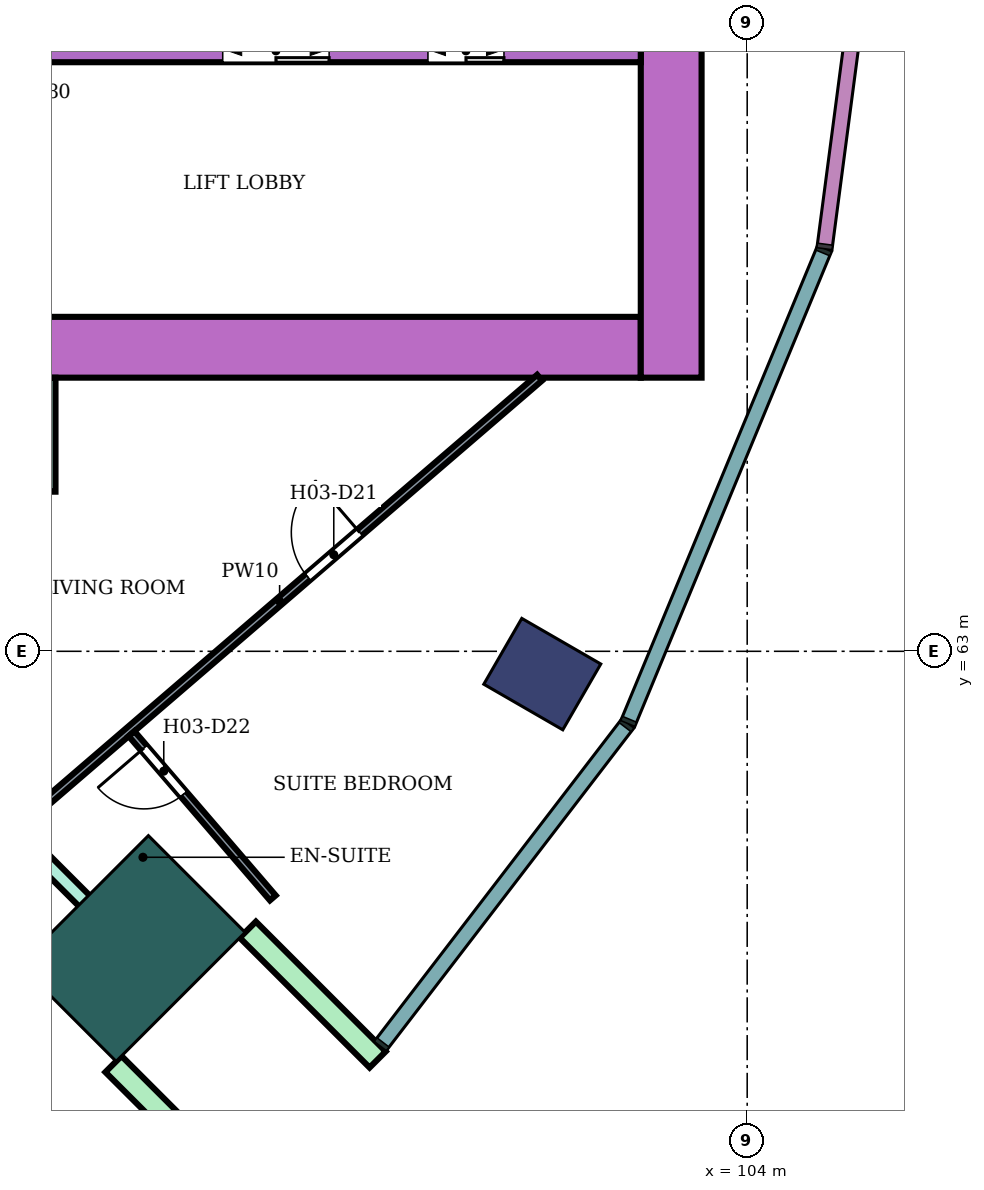
"""IFC4 building model, lengths in metres.
Left out: names, types, materials, properties, quantities, classifications, styles, units other than length and angle.
Written with IfcOpenShell. Run it as: python <this file> out.ifc"""

import sys

from ifc_helpers import new_model, si_unit, direction, frame, frame_2d, origin, origin_2d, place, context, subcontext, project, spatial, rectangle, extrude, element, fill, save


model = new_model("IFC4")
c1 = context("Model", 3, precision=1e-05, world=origin(), true_north=direction((0.0, 1.0)))
c2 = subcontext(c1, "Body", "Model", "MODEL_VIEW")
j1 = project(units=[si_unit("LENGTHUNIT", "METRE"), si_unit("PLANEANGLEUNIT", "RADIAN")], contexts=[c1])
p1 = place(None, origin())
s1 = spatial("IfcSite", under=j1, at=p1, CompositionType="ELEMENT")
p2 = place(p1, origin())
s2 = spatial("IfcBuilding", under=s1, at=p2, CompositionType="ELEMENT")
p3 = place(p2, frame((0.0, 0.0, 55.4)))
s3 = spatial("IfcBuildingStorey", under=s2, at=p3, CompositionType="ELEMENT", Elevation=55.4)
p4 = place(p3, frame((101.304, 62.7, 0.0), z_axis=(0.0, 0.0, 1.0), x_axis=(0.866025403784, -0.5, 0.0)))
e1 = element("IfcColumn", 1, at=p4, inside=s3, PredefinedType="COLUMN", context=c2, shape_type="SweptSolid", body=[
    extrude(rectangle(XDim=1.2, YDim=1.0, at=origin_2d()), origin(), (0.0, 0.0, 1.0), 3.8),
])
p5 = place(p3, frame((95.91, 59.09, 0.0), z_axis=(0.0, 0.0, 1.0), x_axis=(0.707106781187, -0.707106781187, 0.0)))
e2 = element("IfcColumn", 2, at=p5, inside=s3, PredefinedType="COLUMN", context=c2, shape_type="SweptSolid", body=[
    extrude(rectangle(XDim=1.8, YDim=2.4, at=origin_2d()), origin(), (0.0, 0.0, 1.0), 3.8),
])
p6 = place(p3, frame((87.9, 67.0, 0.0), z_axis=(0.0, 0.0, 1.0), x_axis=(1.0, 0.0, 0.0)))
e3 = element("IfcWall", 3, at=p6, inside=s3, PredefinedType="SHEAR", context=c2, shape_type="SweptSolid", body=[
    extrude(rectangle(XDim=14.7, YDim=0.8, at=frame_2d((7.35, 0.0))), origin(), (0.0, 0.0, 1.0), 3.48),
])
p7 = place(p6, frame((4.2, 0.0, 0.0)))
e4 = element("IfcOpeningElement", 4, at=p7, cuts=e3, PredefinedType="OPENING", context=c2, shape_type="SweptSolid", body=[
    extrude(rectangle(XDim=2.4, YDim=2.4, at=frame_2d((1.2, 1.2))), frame((0.0, 0.41, 0.0), z_axis=(0.0, -1.0, 0.0), x_axis=(1.0, 0.0, 0.0)), (0.0, 0.0, 1.0), 0.82),
])
p8 = place(p3, frame((103.0, 66.6, 0.0), z_axis=(0.0, 0.0, 1.0), x_axis=(0.0, 1.0, 0.0)))
e5 = element("IfcWall", 5, at=p8, inside=s3, PredefinedType="SHEAR", context=c2, shape_type="SweptSolid", body=[
    extrude(rectangle(XDim=16.8, YDim=0.8, at=frame_2d((8.4, 0.0))), origin(), (0.0, 0.0, 1.0), 3.48),
])
p9 = place(p3, frame((91.7, 70.9, 0.0), z_axis=(0.0, 0.0, 1.0), x_axis=(1.0, 0.0, 0.0)))
e6 = element("IfcWall", 6, at=p9, inside=s3, PredefinedType="SHEAR", context=c2, shape_type="SweptSolid", body=[
    extrude(rectangle(XDim=10.9, YDim=0.3, at=frame_2d((5.45, 0.0))), origin(), (0.0, 0.0, 1.0), 3.48),
])
p10 = place(p9, frame((0.4, 0.0, 0.0)))
e7 = element("IfcOpeningElement", 7, at=p10, cuts=e6, PredefinedType="OPENING", context=c2, shape_type="SweptSolid", body=[
    extrude(rectangle(XDim=1.4, YDim=2.1, at=frame_2d((0.7, 1.05))), frame((0.0, 0.16, 0.0), z_axis=(0.0, -1.0, 0.0), x_axis=(1.0, 0.0, 0.0)), (0.0, 0.0, 1.0), 0.32),
])
p11 = place(p9, frame((5.4, 0.0, 0.0)))
e8 = element("IfcOpeningElement", 8, at=p11, cuts=e6, PredefinedType="OPENING", context=c2, shape_type="SweptSolid", body=[
    extrude(rectangle(XDim=1.4, YDim=2.1, at=frame_2d((0.7, 1.05))), frame((0.0, 0.16, 0.0), z_axis=(0.0, -1.0, 0.0), x_axis=(1.0, 0.0, 0.0)), (0.0, 0.0, 1.0), 0.32),
])
p12 = place(p9, frame((8.1, 0.0, 0.0)))
e9 = element("IfcOpeningElement", 9, at=p12, cuts=e6, PredefinedType="OPENING", context=c2, shape_type="SweptSolid", body=[
    extrude(rectangle(XDim=1.0, YDim=2.1, at=frame_2d((0.5, 1.05))), frame((0.0, 0.16, 0.0), z_axis=(0.0, -1.0, 0.0), x_axis=(1.0, 0.0, 0.0)), (0.0, 0.0, 1.0), 0.32),
])
for number, where, z_axis, x_axis in (
    (10, (95.662, 57.57, 0.0), (0.0, 0.0, 1.0), (0.707, -0.707, 0.0)),
    (11, (97.43, 59.338, 0.0), (0.0, 0.0, 1.0), (0.707, -0.707, 0.0)),
):
    element("IfcWall", number, at=place(p3, frame(where, z_axis=z_axis, x_axis=x_axis)), inside=s3, PredefinedType="NOTDEFINED", context=c2, shape_type="SweptSolid", body=[
        extrude(rectangle(XDim=2.416, YDim=0.3, at=frame_2d((1.208, 0.0))), origin(), (0.0, 0.0, 1.0), 3.8),
    ])
p13 = place(p3, frame((91.449, 63.548, 0.0), z_axis=(0.0, 0.0, 1.0), x_axis=(0.706984810649, -0.707228730688, 0.0)))
e12 = element("IfcWall", 12, at=p13, inside=s3, PredefinedType="PARTITIONING", context=c2, shape_type="SweptSolid", body=[
    extrude(rectangle(XDim=7.006, YDim=0.2, at=frame_2d((3.503, 0.0))), origin(), (0.0, 0.0, 1.0), 3.35),
])
p14 = place(p3, frame((94.8, 65.1, 0.0), z_axis=(0.0, 0.0, 1.0), x_axis=(0.0, 1.0, 0.0)))
e13 = element("IfcWall", 13, at=p14, inside=s3, PredefinedType="PARTITIONING", context=c2, shape_type="SweptSolid", body=[
    extrude(rectangle(XDim=1.499, YDim=0.2, at=frame_2d((0.75, 0.0))), origin(), (0.0, 0.0, 1.0), 3.35),
])
p15 = place(p3, frame((94.428, 60.715, 0.0), z_axis=(0.0, 0.0, 1.0), x_axis=(0.758117248367, 0.65211826974, 0.0)))
e14 = element("IfcWall", 14, at=p15, inside=s3, PredefinedType="PARTITIONING", context=c2, shape_type="SweptSolid", body=[
    extrude(rectangle(XDim=9.024, YDim=0.1, at=frame_2d((4.512, 0.0))), origin(), (0.0, 0.0, 1.0), 3.35),
])
p16 = place(p15, frame((5.002, 0.0, 0.0)))
e15 = element("IfcOpeningElement", 15, at=p16, cuts=e14, PredefinedType="OPENING", context=c2, shape_type="SweptSolid", body=[
    extrude(rectangle(XDim=0.9, YDim=2.1, at=frame_2d((0.45, 1.05))), frame((0.0, 0.06, 0.0), z_axis=(0.0, -1.0, 0.0), x_axis=(1.0, 0.0, 0.0)), (0.0, 0.0, 1.0), 0.12),
])
p17 = place(p3, frame((95.901, 61.916, 0.0), z_axis=(0.0, 0.0, 1.0), x_axis=(0.652215581117, -0.758033532074, 0.0)))
e16 = element("IfcWall", 16, at=p17, inside=s3, PredefinedType="PARTITIONING", context=c2, shape_type="SweptSolid", body=[
    extrude(rectangle(XDim=2.849, YDim=0.1, at=frame_2d((1.425, 0.0))), origin(), (0.0, 0.0, 1.0), 3.35),
])
p18 = place(p17, frame((0.25, 0.0, 0.0)))
e17 = element("IfcOpeningElement", 17, at=p18, cuts=e16, PredefinedType="OPENING", context=c2, shape_type="SweptSolid", body=[
    extrude(rectangle(XDim=0.8, YDim=2.1, at=frame_2d((0.4, 1.05))), frame((0.0, 0.06, 0.0), z_axis=(0.0, -1.0, 0.0), x_axis=(1.0, 0.0, 0.0)), (0.0, 0.0, 1.0), 0.12),
])
p19 = place(p16, origin())
e18 = element("IfcDoor", 18, at=p19, inside=s3, OperationType="SINGLE_SWING_RIGHT", PredefinedType="DOOR", context=c2, shape_type="SweptSolid", body=[
    extrude(rectangle(XDim=0.9, YDim=2.1, at=frame_2d((0.45, 1.05))), frame((0.0, 0.025, 0.0), z_axis=(0.0, -1.0, 0.0), x_axis=(1.0, 0.0, 0.0)), (0.0, 0.0, 1.0), 0.05),
])
fill(e15, e18)
p20 = place(p18, frame((0.8, 0.0, 0.0), z_axis=(0.0, 0.0, 1.0), x_axis=(-1.0, 0.0, 0.0)))
e19 = element("IfcDoor", 19, at=p20, inside=s3, OperationType="SINGLE_SWING_RIGHT", PredefinedType="DOOR", context=c2, shape_type="SweptSolid", body=[
    extrude(rectangle(XDim=0.8, YDim=2.1, at=frame_2d((0.4, 1.05))), frame((0.0, 0.025, 0.0), z_axis=(0.0, -1.0, 0.0), x_axis=(1.0, 0.0, 0.0)), (0.0, 0.0, 1.0), 0.05),
])
fill(e17, e19)
save(model, sys.argv[1])
